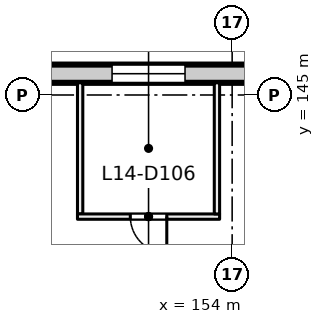
"""IFC4 building model, lengths in metres.
Left out: names, types, materials, properties, quantities, classifications, styles, units other than length and angle.
Written with IfcOpenShell. Run it as: python <this file> out.ifc"""

import sys

from ifc_helpers import new_model, si_unit, direction, frame, frame_2d, origin, place, context, subcontext, project, spatial, rectangle, extrude, element, fill, save


model = new_model("IFC4")
c1 = context("Model", 3, precision=1e-05, world=origin(), true_north=direction((0.0, 1.0)))
c2 = subcontext(c1, "Body", "Model", "MODEL_VIEW")
j1 = project(units=[si_unit("LENGTHUNIT", "METRE"), si_unit("PLANEANGLEUNIT", "RADIAN")], contexts=[c1])
p1 = place(None, origin())
s1 = spatial("IfcSite", under=j1, at=p1, CompositionType="ELEMENT")
p2 = place(p1, origin())
s2 = spatial("IfcBuilding", under=s1, at=p2, CompositionType="ELEMENT")
p3 = place(p2, frame((0.0, 0.0, 63.5)))
s3 = spatial("IfcBuildingStorey", under=s2, at=p3, CompositionType="ELEMENT", Elevation=63.5)
p4 = place(p3, frame((131.07, 145.7, 0.0), z_axis=(0.0, 0.0, 1.0), x_axis=(1.0, 0.0, 0.0)))
e1 = element("IfcWall", 1, at=p4, inside=s3, PredefinedType="SOLIDWALL", context=c2, shape_type="SweptSolid", body=[
    extrude(rectangle(XDim=31.93, YDim=0.6, at=frame_2d((15.965, 0.0))), origin(), (0.0, 0.0, 1.0), 3.625),
])
p5 = place(p4, frame((0.98, 0.0, 0.9)))
e2 = element("IfcOpeningElement", 2, at=p5, cuts=e1, PredefinedType="OPENING", context=c2, shape_type="SweptSolid", body=[
    extrude(rectangle(XDim=2.4, YDim=2.4, at=frame_2d((1.2, 1.2))), frame((0.0, 0.31, 0.0), z_axis=(0.0, -1.0, 0.0), x_axis=(1.0, 0.0, 0.0)), (0.0, 0.0, 1.0), 0.62),
])
p6 = place(p4, frame((5.48, 0.0, 0.9)))
e3 = element("IfcOpeningElement", 3, at=p6, cuts=e1, PredefinedType="OPENING", context=c2, shape_type="SweptSolid", body=[
    extrude(rectangle(XDim=2.4, YDim=2.4, at=frame_2d((1.2, 1.2))), frame((0.0, 0.31, 0.0), z_axis=(0.0, -1.0, 0.0), x_axis=(1.0, 0.0, 0.0)), (0.0, 0.0, 1.0), 0.62),
])
p7 = place(p4, frame((9.98, 0.0, 0.9)))
e4 = element("IfcOpeningElement", 4, at=p7, cuts=e1, PredefinedType="OPENING", context=c2, shape_type="SweptSolid", body=[
    extrude(rectangle(XDim=2.4, YDim=2.4, at=frame_2d((1.2, 1.2))), frame((0.0, 0.31, 0.0), z_axis=(0.0, -1.0, 0.0), x_axis=(1.0, 0.0, 0.0)), (0.0, 0.0, 1.0), 0.62),
])
p8 = place(p4, frame((14.48, 0.0, 0.9)))
e5 = element("IfcOpeningElement", 5, at=p8, cuts=e1, PredefinedType="OPENING", context=c2, shape_type="SweptSolid", body=[
    extrude(rectangle(XDim=2.4, YDim=2.4, at=frame_2d((1.2, 1.2))), frame((0.0, 0.31, 0.0), z_axis=(0.0, -1.0, 0.0), x_axis=(1.0, 0.0, 0.0)), (0.0, 0.0, 1.0), 0.62),
])
p9 = place(p4, frame((18.98, 0.0, 0.9)))
e6 = element("IfcOpeningElement", 6, at=p9, cuts=e1, PredefinedType="OPENING", context=c2, shape_type="SweptSolid", body=[
    extrude(rectangle(XDim=2.4, YDim=2.4, at=frame_2d((1.2, 1.2))), frame((0.0, 0.31, 0.0), z_axis=(0.0, -1.0, 0.0), x_axis=(1.0, 0.0, 0.0)), (0.0, 0.0, 1.0), 0.62),
])
p10 = place(p4, frame((23.48, 0.0, 0.9)))
e7 = element("IfcOpeningElement", 7, at=p10, cuts=e1, PredefinedType="OPENING", context=c2, shape_type="SweptSolid", body=[
    extrude(rectangle(XDim=2.4, YDim=2.4, at=frame_2d((1.2, 1.2))), frame((0.0, 0.31, 0.0), z_axis=(0.0, -1.0, 0.0), x_axis=(1.0, 0.0, 0.0)), (0.0, 0.0, 1.0), 0.62),
])
p11 = place(p4, frame((27.98, 0.0, 0.9)))
e8 = element("IfcOpeningElement", 8, at=p11, cuts=e1, PredefinedType="OPENING", context=c2, shape_type="SweptSolid", body=[
    extrude(rectangle(XDim=2.4, YDim=2.4, at=frame_2d((1.2, 1.2))), frame((0.0, 0.31, 0.0), z_axis=(0.0, -1.0, 0.0), x_axis=(1.0, 0.0, 0.0)), (0.0, 0.0, 1.0), 0.62),
])
p12 = place(p3, frame((149.0, 141.088, 0.0), z_axis=(0.0, 0.0, 1.0), x_axis=(0.0, 1.0, 0.0)))
e9 = element("IfcWall", 9, at=p12, inside=s3, PredefinedType="PARTITIONING", context=c2, shape_type="SweptSolid", body=[
    extrude(rectangle(XDim=4.312, YDim=0.175, at=frame_2d((2.156, 0.0))), origin(), (0.0, 0.0, 1.0), 3.625),
])
p13 = place(p3, frame((153.588, 141.0, 0.0), z_axis=(0.0, 0.0, 1.0), x_axis=(-1.0, 0.0, 0.0)))
e10 = element("IfcWall", 10, at=p13, inside=s3, PredefinedType="PARTITIONING", context=c2, shape_type="SweptSolid", body=[
    extrude(rectangle(XDim=4.676, YDim=0.175, at=frame_2d((2.338, 0.0))), origin(), (0.0, 0.0, 1.0), 3.625),
])
p14 = place(p13, frame((1.738, 0.0, 0.0)))
e11 = element("IfcOpeningElement", 11, at=p14, cuts=e10, PredefinedType="OPENING", context=c2, shape_type="SweptSolid", body=[
    extrude(rectangle(XDim=1.2, YDim=2.1, at=frame_2d((0.6, 1.05))), frame((0.0, 0.097, 0.0), z_axis=(0.0, -1.0, 0.0), x_axis=(1.0, 0.0, 0.0)), (0.0, 0.0, 1.0), 0.195),
])
p15 = place(p3, frame((153.5, 145.4, 0.0), z_axis=(0.0, 0.0, 1.0), x_axis=(0.0, -1.0, 0.0)))
e12 = element("IfcWall", 12, at=p15, inside=s3, PredefinedType="PARTITIONING", context=c2, shape_type="SweptSolid", body=[
    extrude(rectangle(XDim=4.312, YDim=0.175, at=frame_2d((2.156, 0.0))), origin(), (0.0, 0.0, 1.0), 3.625),
])
p16 = place(p9, origin())
e13 = element("IfcWindow", 13, at=p16, inside=s3, PartitioningType="SINGLE_PANEL", PredefinedType="WINDOW", context=c2, shape_type="SweptSolid", body=[
    extrude(rectangle(XDim=2.4, YDim=2.4, at=frame_2d((1.2, 1.2))), frame((0.0, 0.03, 0.0), z_axis=(0.0, -1.0, 0.0), x_axis=(1.0, 0.0, 0.0)), (0.0, 0.0, 1.0), 0.06),
])
fill(e6, e13)
p17 = place(p14, origin())
e14 = element("IfcDoor", 14, at=p17, inside=s3, OperationType="DOUBLE_DOOR_SINGLE_SWING", PredefinedType="DOOR", context=c2, shape_type="SweptSolid", body=[
    extrude(rectangle(XDim=1.2, YDim=2.1, at=frame_2d((0.6, 1.05))), frame((0.0, 0.025, 0.0), z_axis=(0.0, -1.0, 0.0), x_axis=(1.0, 0.0, 0.0)), (0.0, 0.0, 1.0), 0.05),
])
fill(e11, e14)
save(model, sys.argv[1])
